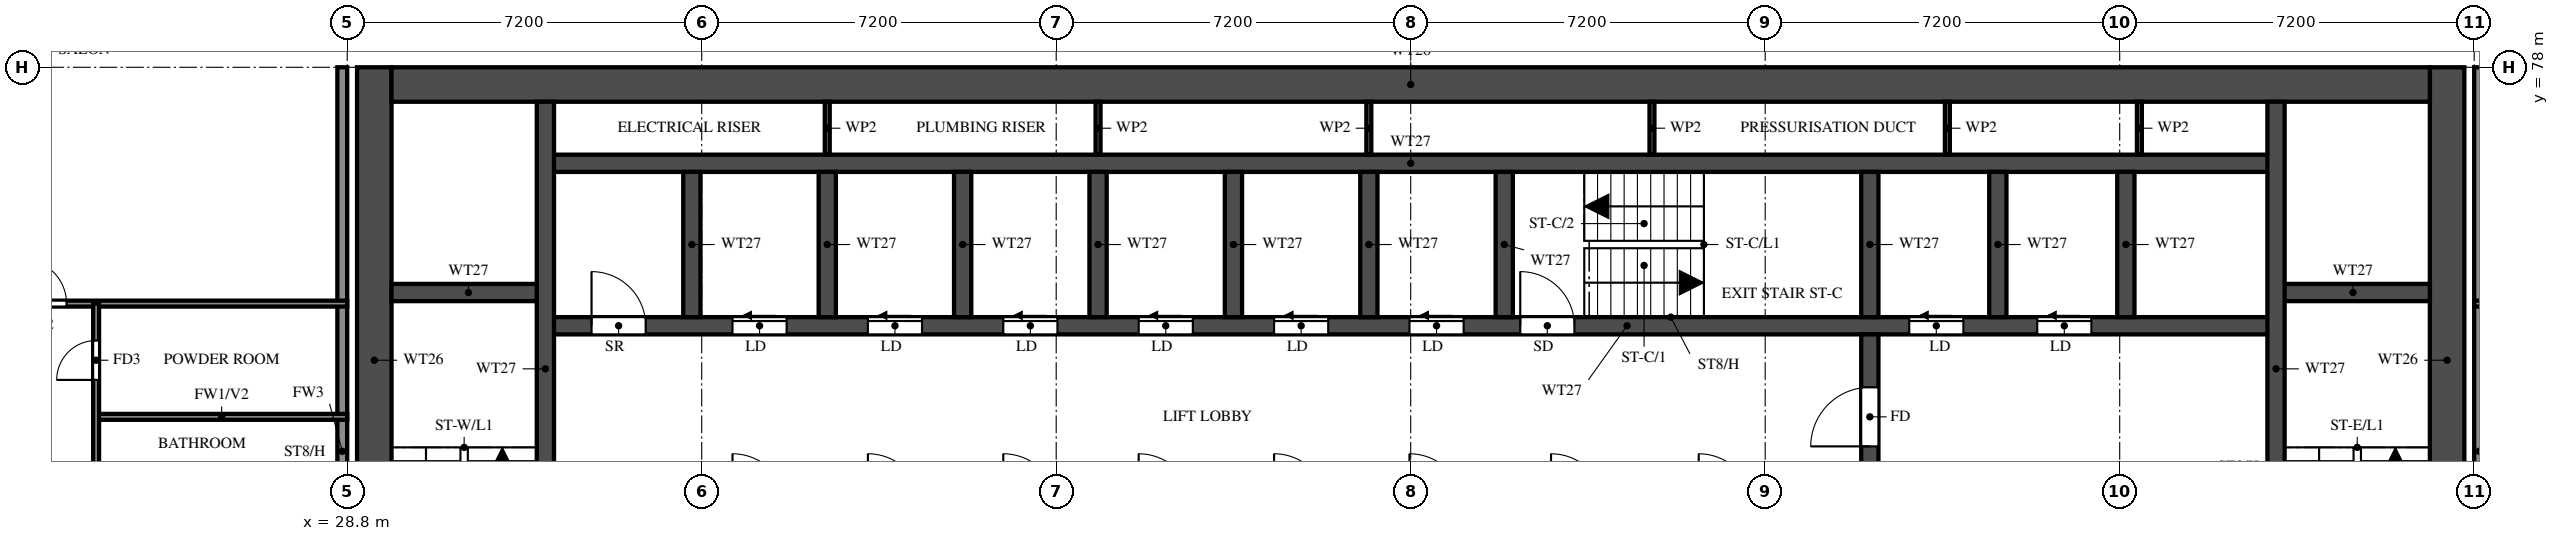
"""IFC4 building model, lengths in metres.
Left out: names, types, materials, properties, quantities, classifications, styles, units other than length and angle.
Written with IfcOpenShell. Run it as: python <this file> out.ifc"""

import sys

from ifc_helpers import new_model, si_unit, direction, frame, frame_2d, origin, place, context, subcontext, project, spatial, rectangle, extrude, element, fill, save


model = new_model("IFC4")
c1 = context("Model", 3, precision=1e-05, world=origin(), true_north=direction((0.0, 1.0)))
c2 = subcontext(c1, "Body", "Model", "MODEL_VIEW")
j1 = project(units=[si_unit("LENGTHUNIT", "METRE"), si_unit("PLANEANGLEUNIT", "RADIAN")], contexts=[c1])
p1 = place(None, origin())
s1 = spatial("IfcSite", under=j1, at=p1, CompositionType="ELEMENT")
p2 = place(p1, origin())
s2 = spatial("IfcBuilding", under=s1, at=p2, CompositionType="ELEMENT")
p3 = place(p2, frame((0.0, 0.0, 181.5)))
s3 = spatial("IfcBuildingStorey", under=s2, at=p3, CompositionType="ELEMENT", Elevation=181.5)
for number, where, z_axis, x_axis in (
    (1, (29.35, 66.1, 0.0), (0.0, 0.0, 1.0), (0.0, 1.0, 0.0)),
    (2, (71.45, 66.1, 0.0), (0.0, 0.0, 1.0), (0.0, 1.0, 0.0)),
):
    element("IfcWall", number, at=place(p3, frame(where, z_axis=z_axis, x_axis=x_axis)), inside=s3, PredefinedType="SHEAR", context=c2, shape_type="SweptSolid", body=[
        extrude(rectangle(XDim=11.9, YDim=0.7, at=frame_2d((5.95, 0.0))), origin(), (0.0, 0.0, 1.0), 3.2),
    ])
p4 = place(p3, frame((29.7, 77.65, 0.0), z_axis=(0.0, 0.0, 1.0), x_axis=(1.0, 0.0, 0.0)))
e3 = element("IfcWall", 3, at=p4, inside=s3, PredefinedType="SHEAR", context=c2, shape_type="SweptSolid", body=[
    extrude(rectangle(XDim=41.4, YDim=0.7, at=frame_2d((20.7, 0.0))), origin(), (0.0, 0.0, 1.0), 3.2),
])
p5 = place(p3, frame((32.825, 72.75, 0.0), z_axis=(0.0, 0.0, 1.0), x_axis=(1.0, 0.0, 0.0)))
e4 = element("IfcWall", 4, at=p5, inside=s3, PredefinedType="SHEAR", context=c2, shape_type="SweptSolid", body=[
    extrude(rectangle(XDim=35.15, YDim=0.35, at=frame_2d((17.575, 0.0))), origin(), (0.0, 0.0, 1.0), 3.2),
])
p6 = place(p5, frame((19.8, 0.0, 0.0)))
e5 = element("IfcOpeningElement", 5, at=p6, cuts=e4, PredefinedType="OPENING", context=c2, shape_type="SweptSolid", body=[
    extrude(rectangle(XDim=1.1, YDim=2.1, at=frame_2d((0.55, 1.05))), frame((0.0, 0.185, 0.0), z_axis=(0.0, -1.0, 0.0), x_axis=(1.0, 0.0, 0.0)), (0.0, 0.0, 1.0), 0.37),
])
p7 = place(p5, frame((27.7, 0.0, 0.0)))
e6 = element("IfcOpeningElement", 6, at=p7, cuts=e4, PredefinedType="OPENING", context=c2, shape_type="SweptSolid", body=[
    extrude(rectangle(XDim=1.1, YDim=2.1, at=frame_2d((0.55, 1.05))), frame((0.0, 0.185, 0.0), z_axis=(0.0, -1.0, 0.0), x_axis=(1.0, 0.0, 0.0)), (0.0, 0.0, 1.0), 0.37),
])
p8 = place(p5, frame((30.3, 0.0, 0.0)))
e7 = element("IfcOpeningElement", 7, at=p8, cuts=e4, PredefinedType="OPENING", context=c2, shape_type="SweptSolid", body=[
    extrude(rectangle(XDim=1.1, YDim=2.1, at=frame_2d((0.55, 1.05))), frame((0.0, 0.185, 0.0), z_axis=(0.0, -1.0, 0.0), x_axis=(1.0, 0.0, 0.0)), (0.0, 0.0, 1.0), 0.37),
])
p9 = place(p5, frame((3.8, 0.0, 0.0)))
e8 = element("IfcOpeningElement", 8, at=p9, cuts=e4, PredefinedType="OPENING", context=c2, shape_type="SweptSolid", body=[
    extrude(rectangle(XDim=1.1, YDim=2.1, at=frame_2d((0.55, 1.05))), frame((0.0, 0.185, 0.0), z_axis=(0.0, -1.0, 0.0), x_axis=(1.0, 0.0, 0.0)), (0.0, 0.0, 1.0), 0.37),
])
p10 = place(p5, frame((6.55, 0.0, 0.0)))
e9 = element("IfcOpeningElement", 9, at=p10, cuts=e4, PredefinedType="OPENING", context=c2, shape_type="SweptSolid", body=[
    extrude(rectangle(XDim=1.1, YDim=2.1, at=frame_2d((0.55, 1.05))), frame((0.0, 0.185, 0.0), z_axis=(0.0, -1.0, 0.0), x_axis=(1.0, 0.0, 0.0)), (0.0, 0.0, 1.0), 0.37),
])
p11 = place(p5, frame((9.3, 0.0, 0.0)))
e10 = element("IfcOpeningElement", 10, at=p11, cuts=e4, PredefinedType="OPENING", context=c2, shape_type="SweptSolid", body=[
    extrude(rectangle(XDim=1.1, YDim=2.1, at=frame_2d((0.55, 1.05))), frame((0.0, 0.185, 0.0), z_axis=(0.0, -1.0, 0.0), x_axis=(1.0, 0.0, 0.0)), (0.0, 0.0, 1.0), 0.37),
])
p12 = place(p5, frame((12.05, 0.0, 0.0)))
e11 = element("IfcOpeningElement", 11, at=p12, cuts=e4, PredefinedType="OPENING", context=c2, shape_type="SweptSolid", body=[
    extrude(rectangle(XDim=1.1, YDim=2.1, at=frame_2d((0.55, 1.05))), frame((0.0, 0.185, 0.0), z_axis=(0.0, -1.0, 0.0), x_axis=(1.0, 0.0, 0.0)), (0.0, 0.0, 1.0), 0.37),
])
p13 = place(p5, frame((14.8, 0.0, 0.0)))
e12 = element("IfcOpeningElement", 12, at=p13, cuts=e4, PredefinedType="OPENING", context=c2, shape_type="SweptSolid", body=[
    extrude(rectangle(XDim=1.1, YDim=2.1, at=frame_2d((0.55, 1.05))), frame((0.0, 0.185, 0.0), z_axis=(0.0, -1.0, 0.0), x_axis=(1.0, 0.0, 0.0)), (0.0, 0.0, 1.0), 0.37),
])
p14 = place(p5, frame((17.55, 0.0, 0.0)))
e13 = element("IfcOpeningElement", 13, at=p14, cuts=e4, PredefinedType="OPENING", context=c2, shape_type="SweptSolid", body=[
    extrude(rectangle(XDim=1.1, YDim=2.1, at=frame_2d((0.55, 1.05))), frame((0.0, 0.185, 0.0), z_axis=(0.0, -1.0, 0.0), x_axis=(1.0, 0.0, 0.0)), (0.0, 0.0, 1.0), 0.37),
])
p15 = place(p5, frame((0.938, 0.0, 0.0)))
e14 = element("IfcOpeningElement", 14, at=p15, cuts=e4, PredefinedType="OPENING", context=c2, shape_type="SweptSolid", body=[
    extrude(rectangle(XDim=1.1, YDim=2.1, at=frame_2d((0.55, 1.05))), frame((0.0, 0.185, 0.0), z_axis=(0.0, -1.0, 0.0), x_axis=(1.0, 0.0, 0.0)), (0.0, 0.0, 1.0), 0.37),
])
p16 = place(p3, frame((32.825, 76.05, 0.0), z_axis=(0.0, 0.0, 1.0), x_axis=(1.0, 0.0, 0.0)))
e15 = element("IfcWall", 15, at=p16, inside=s3, PredefinedType="SHEAR", context=c2, shape_type="SweptSolid", body=[
    extrude(rectangle(XDim=35.15, YDim=0.35, at=frame_2d((17.575, 0.0))), origin(), (0.0, 0.0, 1.0), 3.2),
])
for number, where, z_axis, x_axis in (
    (16, (29.7, 73.425, 0.0), (0.0, 0.0, 1.0), (1.0, 0.0, 0.0)),
    (17, (67.975, 73.425, 0.0), (0.0, 0.0, 1.0), (1.0, 0.0, 0.0)),
):
    element("IfcWall", number, at=place(p3, frame(where, z_axis=z_axis, x_axis=x_axis)), inside=s3, PredefinedType="SHEAR", context=c2, shape_type="SweptSolid", body=[
        extrude(rectangle(XDim=3.125, YDim=0.35, at=frame_2d((1.562, 0.0))), origin(), (0.0, 0.0, 1.0), 3.2),
    ])
p17 = place(p3, frame((32.825, 66.45, 0.0), z_axis=(0.0, 0.0, 1.0), x_axis=(0.0, 1.0, 0.0)))
e18 = element("IfcWall", 18, at=p17, inside=s3, PredefinedType="SHEAR", context=c2, shape_type="SweptSolid", body=[
    extrude(rectangle(XDim=10.85, YDim=0.35, at=frame_2d((5.425, 0.0))), origin(), (0.0, 0.0, 1.0), 3.2),
])
p18 = place(p3, frame((67.975, 66.45, 0.0), z_axis=(0.0, 0.0, 1.0), x_axis=(0.0, 1.0, 0.0)))
e19 = element("IfcWall", 19, at=p18, inside=s3, PredefinedType="SHEAR", context=c2, shape_type="SweptSolid", body=[
    extrude(rectangle(XDim=10.85, YDim=0.35, at=frame_2d((5.425, 0.0))), origin(), (0.0, 0.0, 1.0), 3.2),
])
p19 = place(p18, frame((0.15, 0.0, 0.0)))
e20 = element("IfcOpeningElement", 20, at=p19, cuts=e19, PredefinedType="OPENING", context=c2, shape_type="SweptSolid", body=[
    extrude(rectangle(XDim=1.1, YDim=2.1, at=frame_2d((0.55, 1.05))), frame((0.0, 0.185, 0.0), z_axis=(0.0, -1.0, 0.0), x_axis=(1.0, 0.0, 0.0)), (0.0, 0.0, 1.0), 0.37),
])
p20 = place(p3, frame((59.725, 66.45, 0.0), z_axis=(0.0, 0.0, 1.0), x_axis=(0.0, 1.0, 0.0)))
e21 = element("IfcWall", 21, at=p20, inside=s3, PredefinedType="SHEAR", context=c2, shape_type="SweptSolid", body=[
    extrude(rectangle(XDim=6.125, YDim=0.35, at=frame_2d((3.062, 0.0))), origin(), (0.0, 0.0, 1.0), 3.2),
])
p21 = place(p20, frame((3.85, 0.0, 0.0)))
e22 = element("IfcOpeningElement", 22, at=p21, cuts=e21, PredefinedType="OPENING", context=c2, shape_type="SweptSolid", body=[
    extrude(rectangle(XDim=1.2, YDim=2.1, at=frame_2d((0.6, 1.05))), frame((0.0, 0.185, 0.0), z_axis=(0.0, -1.0, 0.0), x_axis=(1.0, 0.0, 0.0)), (0.0, 0.0, 1.0), 0.37),
])
for number, where, z_axis, x_axis in (
    (23, (59.725, 72.925, 0.0), (0.0, 0.0, 1.0), (0.0, 1.0, 0.0)),
    (24, (35.8, 72.925, 0.0), (0.0, 0.0, 1.0), (0.0, 1.0, 0.0)),
    (25, (38.55, 72.925, 0.0), (0.0, 0.0, 1.0), (0.0, 1.0, 0.0)),
    (26, (41.3, 72.925, 0.0), (0.0, 0.0, 1.0), (0.0, 1.0, 0.0)),
    (27, (44.05, 72.925, 0.0), (0.0, 0.0, 1.0), (0.0, 1.0, 0.0)),
    (28, (46.8, 72.925, 0.0), (0.0, 0.0, 1.0), (0.0, 1.0, 0.0)),
    (29, (49.55, 72.925, 0.0), (0.0, 0.0, 1.0), (0.0, 1.0, 0.0)),
    (30, (52.3, 72.925, 0.0), (0.0, 0.0, 1.0), (0.0, 1.0, 0.0)),
    (31, (62.325, 72.925, 0.0), (0.0, 0.0, 1.0), (0.0, 1.0, 0.0)),
    (32, (64.925, 72.925, 0.0), (0.0, 0.0, 1.0), (0.0, 1.0, 0.0)),
):
    element("IfcWall", number, at=place(p3, frame(where, z_axis=z_axis, x_axis=x_axis)), inside=s3, PredefinedType="SHEAR", context=c2, shape_type="SweptSolid", body=[
        extrude(rectangle(XDim=2.95, YDim=0.35, at=frame_2d((1.475, 0.0))), origin(), (0.0, 0.0, 1.0), 3.2),
    ])
for number, where, z_axis, x_axis in (
    (33, (38.55, 76.225, 0.0), (0.0, 0.0, 1.0), (0.0, 1.0, 0.0)),
    (34, (44.05, 76.225, 0.0), (0.0, 0.0, 1.0), (0.0, 1.0, 0.0)),
    (35, (49.55, 76.225, 0.0), (0.0, 0.0, 1.0), (0.0, 1.0, 0.0)),
    (36, (55.3, 76.225, 0.0), (0.0, 0.0, 1.0), (0.0, 1.0, 0.0)),
    (37, (61.3, 76.225, 0.0), (0.0, 0.0, 1.0), (0.0, 1.0, 0.0)),
    (38, (65.2, 76.225, 0.0), (0.0, 0.0, 1.0), (0.0, 1.0, 0.0)),
):
    element("IfcWall", number, at=place(p3, frame(where, z_axis=z_axis, x_axis=x_axis)), inside=s3, PredefinedType="PARTITIONING", context=c2, shape_type="SweptSolid", body=[
        extrude(rectangle(XDim=1.075, YDim=0.1, at=frame_2d((0.538, 0.0))), origin(), (0.0, 0.0, 1.0), 3.2),
    ])
for number, where, z_axis, x_axis in (
    (39, (28.7, 62.4, 0.0), (0.0, 0.0, 1.0), (0.0, 1.0, 0.0)),
    (40, (72.1, 62.4, 0.0), (0.0, 0.0, 1.0), (0.0, 1.0, 0.0)),
):
    element("IfcWall", number, at=place(p3, frame(where, z_axis=z_axis, x_axis=x_axis)), inside=s3, PredefinedType="SOLIDWALL", context=c2, shape_type="SweptSolid", body=[
        extrude(rectangle(XDim=15.6, YDim=0.2, at=frame_2d((7.8, 0.0))), origin(), (0.0, 0.0, 1.0), 3.2),
    ])
p22 = place(p3, frame((23.7, 70.9, 0.0), z_axis=(0.0, 0.0, 1.0), x_axis=(1.0, 0.0, 0.0)))
e41 = element("IfcWall", 41, at=p22, inside=s3, PredefinedType="PARTITIONING", context=c2, shape_type="SweptSolid", body=[
    extrude(rectangle(XDim=5.1, YDim=0.12, at=frame_2d((2.55, 0.0))), origin(), (0.0, 0.0, 1.0), 3.2),
])
p23 = place(p3, frame((14.525, 73.2, 0.0), z_axis=(0.0, 0.0, 1.0), x_axis=(1.0, 0.0, 0.0)))
e42 = element("IfcWall", 42, at=p23, inside=s3, PredefinedType="PARTITIONING", context=c2, shape_type="SweptSolid", body=[
    extrude(rectangle(XDim=14.275, YDim=0.12, at=frame_2d((7.138, 0.0))), origin(), (0.0, 0.0, 1.0), 2.3),
])
p24 = place(p23, frame((7.675, 0.0, 0.0)))
e43 = element("IfcOpeningElement", 43, at=p24, cuts=e42, PredefinedType="OPENING", context=c2, shape_type="SweptSolid", body=[
    extrude(rectangle(XDim=0.9, YDim=2.1, at=frame_2d((0.45, 1.05))), frame((0.0, 0.07, 0.0), z_axis=(0.0, -1.0, 0.0), x_axis=(1.0, 0.0, 0.0)), (0.0, 0.0, 1.0), 0.14),
])
p25 = place(p3, frame((72.0, 73.2, 0.0), z_axis=(0.0, 0.0, 1.0), x_axis=(1.0, 0.0, 0.0)))
e44 = element("IfcWall", 44, at=p25, inside=s3, PredefinedType="PARTITIONING", context=c2, shape_type="SweptSolid", body=[
    extrude(rectangle(XDim=14.275, YDim=0.12, at=frame_2d((7.137, 0.0))), origin(), (0.0, 0.0, 1.0), 2.3),
])
p26 = place(p25, frame((5.7, 0.0, 0.0)))
e45 = element("IfcOpeningElement", 45, at=p26, cuts=e44, PredefinedType="OPENING", context=c2, shape_type="SweptSolid", body=[
    extrude(rectangle(XDim=0.9, YDim=2.1, at=frame_2d((0.45, 1.05))), frame((0.0, 0.07, 0.0), z_axis=(0.0, -1.0, 0.0), x_axis=(1.0, 0.0, 0.0)), (0.0, 0.0, 1.0), 0.14),
])
p27 = place(p3, frame((23.7, 61.2, 0.0), z_axis=(0.0, 0.0, 1.0), x_axis=(0.0, 1.0, 0.0)))
e46 = element("IfcWall", 46, at=p27, inside=s3, PredefinedType="PARTITIONING", context=c2, shape_type="SweptSolid", body=[
    extrude(rectangle(XDim=12.0, YDim=0.12, at=frame_2d((6.0, 0.0))), origin(), (0.0, 0.0, 1.0), 3.2),
])
p28 = place(p27, frame((4.2, 0.0, 0.0)))
e47 = element("IfcOpeningElement", 47, at=p28, cuts=e46, PredefinedType="OPENING", context=c2, shape_type="SweptSolid", body=[
    extrude(rectangle(XDim=0.9, YDim=2.1, at=frame_2d((0.45, 1.05))), frame((0.0, 0.07, 0.0), z_axis=(0.0, -1.0, 0.0), x_axis=(1.0, 0.0, 0.0)), (0.0, 0.0, 1.0), 0.14),
])
p29 = place(p27, frame((7.975, 0.0, 0.0)))
e48 = element("IfcOpeningElement", 48, at=p29, cuts=e46, PredefinedType="OPENING", context=c2, shape_type="SweptSolid", body=[
    extrude(rectangle(XDim=0.8, YDim=2.1, at=frame_2d((0.4, 1.05))), frame((0.0, 0.07, 0.0), z_axis=(0.0, -1.0, 0.0), x_axis=(1.0, 0.0, 0.0)), (0.0, 0.0, 1.0), 0.14),
])
p30 = place(p27, frame((10.45, 0.0, 0.0)))
e49 = element("IfcOpeningElement", 49, at=p30, cuts=e46, PredefinedType="OPENING", context=c2, shape_type="SweptSolid", body=[
    extrude(rectangle(XDim=0.8, YDim=2.1, at=frame_2d((0.4, 1.05))), frame((0.0, 0.07, 0.0), z_axis=(0.0, -1.0, 0.0), x_axis=(1.0, 0.0, 0.0)), (0.0, 0.0, 1.0), 0.14),
])
p31 = place(p6, origin())
e50 = element("IfcDoor", 50, at=p31, inside=s3, OperationType="SINGLE_SWING_LEFT", PredefinedType="DOOR", context=c2, shape_type="SweptSolid", body=[
    extrude(rectangle(XDim=1.1, YDim=2.1, at=frame_2d((0.55, 1.05))), frame((0.0, 0.025, 0.0), z_axis=(0.0, -1.0, 0.0), x_axis=(1.0, 0.0, 0.0)), (0.0, 0.0, 1.0), 0.05),
])
fill(e5, e50)
p32 = place(p21, origin())
e51 = element("IfcDoor", 51, at=p32, inside=s3, OperationType="SINGLE_SWING_LEFT", PredefinedType="DOOR", context=c2, shape_type="SweptSolid", body=[
    extrude(rectangle(XDim=1.2, YDim=2.1, at=frame_2d((0.6, 1.05))), frame((0.0, 0.025, 0.0), z_axis=(0.0, -1.0, 0.0), x_axis=(1.0, 0.0, 0.0)), (0.0, 0.0, 1.0), 0.05),
])
fill(e22, e51)
p33 = place(p7, origin())
e52 = element("IfcDoor", 52, at=p33, inside=s3, OperationType="SLIDING_TO_LEFT", PredefinedType="DOOR", context=c2, shape_type="SweptSolid", body=[
    extrude(rectangle(XDim=1.1, YDim=2.1, at=frame_2d((0.55, 1.05))), frame((0.0, 0.025, 0.0), z_axis=(0.0, -1.0, 0.0), x_axis=(1.0, 0.0, 0.0)), (0.0, 0.0, 1.0), 0.05),
])
fill(e6, e52)
p34 = place(p8, origin())
e53 = element("IfcDoor", 53, at=p34, inside=s3, OperationType="SLIDING_TO_LEFT", PredefinedType="DOOR", context=c2, shape_type="SweptSolid", body=[
    extrude(rectangle(XDim=1.1, YDim=2.1, at=frame_2d((0.55, 1.05))), frame((0.0, 0.025, 0.0), z_axis=(0.0, -1.0, 0.0), x_axis=(1.0, 0.0, 0.0)), (0.0, 0.0, 1.0), 0.05),
])
fill(e7, e53)
p35 = place(p9, origin())
e54 = element("IfcDoor", 54, at=p35, inside=s3, OperationType="SLIDING_TO_LEFT", PredefinedType="DOOR", context=c2, shape_type="SweptSolid", body=[
    extrude(rectangle(XDim=1.1, YDim=2.1, at=frame_2d((0.55, 1.05))), frame((0.0, 0.025, 0.0), z_axis=(0.0, -1.0, 0.0), x_axis=(1.0, 0.0, 0.0)), (0.0, 0.0, 1.0), 0.05),
])
fill(e8, e54)
p36 = place(p10, origin())
e55 = element("IfcDoor", 55, at=p36, inside=s3, OperationType="SLIDING_TO_LEFT", PredefinedType="DOOR", context=c2, shape_type="SweptSolid", body=[
    extrude(rectangle(XDim=1.1, YDim=2.1, at=frame_2d((0.55, 1.05))), frame((0.0, 0.025, 0.0), z_axis=(0.0, -1.0, 0.0), x_axis=(1.0, 0.0, 0.0)), (0.0, 0.0, 1.0), 0.05),
])
fill(e9, e55)
p37 = place(p11, origin())
e56 = element("IfcDoor", 56, at=p37, inside=s3, OperationType="SLIDING_TO_LEFT", PredefinedType="DOOR", context=c2, shape_type="SweptSolid", body=[
    extrude(rectangle(XDim=1.1, YDim=2.1, at=frame_2d((0.55, 1.05))), frame((0.0, 0.025, 0.0), z_axis=(0.0, -1.0, 0.0), x_axis=(1.0, 0.0, 0.0)), (0.0, 0.0, 1.0), 0.05),
])
fill(e10, e56)
p38 = place(p12, origin())
e57 = element("IfcDoor", 57, at=p38, inside=s3, OperationType="SLIDING_TO_LEFT", PredefinedType="DOOR", context=c2, shape_type="SweptSolid", body=[
    extrude(rectangle(XDim=1.1, YDim=2.1, at=frame_2d((0.55, 1.05))), frame((0.0, 0.025, 0.0), z_axis=(0.0, -1.0, 0.0), x_axis=(1.0, 0.0, 0.0)), (0.0, 0.0, 1.0), 0.05),
])
fill(e11, e57)
p39 = place(p13, origin())
e58 = element("IfcDoor", 58, at=p39, inside=s3, OperationType="SLIDING_TO_LEFT", PredefinedType="DOOR", context=c2, shape_type="SweptSolid", body=[
    extrude(rectangle(XDim=1.1, YDim=2.1, at=frame_2d((0.55, 1.05))), frame((0.0, 0.025, 0.0), z_axis=(0.0, -1.0, 0.0), x_axis=(1.0, 0.0, 0.0)), (0.0, 0.0, 1.0), 0.05),
])
fill(e12, e58)
p40 = place(p14, origin())
e59 = element("IfcDoor", 59, at=p40, inside=s3, OperationType="SLIDING_TO_LEFT", PredefinedType="DOOR", context=c2, shape_type="SweptSolid", body=[
    extrude(rectangle(XDim=1.1, YDim=2.1, at=frame_2d((0.55, 1.05))), frame((0.0, 0.025, 0.0), z_axis=(0.0, -1.0, 0.0), x_axis=(1.0, 0.0, 0.0)), (0.0, 0.0, 1.0), 0.05),
])
fill(e13, e59)
p41 = place(p15, origin())
e60 = element("IfcDoor", 60, at=p41, inside=s3, OperationType="SINGLE_SWING_LEFT", PredefinedType="DOOR", context=c2, shape_type="SweptSolid", body=[
    extrude(rectangle(XDim=1.1, YDim=2.1, at=frame_2d((0.55, 1.05))), frame((0.0, 0.025, 0.0), z_axis=(0.0, -1.0, 0.0), x_axis=(1.0, 0.0, 0.0)), (0.0, 0.0, 1.0), 0.05),
])
fill(e14, e60)
p42 = place(p24, origin())
e61 = element("IfcDoor", 61, at=p42, inside=s3, OperationType="SINGLE_SWING_RIGHT", PredefinedType="DOOR", context=c2, shape_type="SweptSolid", body=[
    extrude(rectangle(XDim=0.9, YDim=2.1, at=frame_2d((0.45, 1.05))), frame((0.0, 0.025, 0.0), z_axis=(0.0, -1.0, 0.0), x_axis=(1.0, 0.0, 0.0)), (0.0, 0.0, 1.0), 0.05),
])
fill(e43, e61)
p43 = place(p30, origin())
e62 = element("IfcDoor", 62, at=p43, inside=s3, OperationType="SINGLE_SWING_LEFT", PredefinedType="DOOR", context=c2, shape_type="SweptSolid", body=[
    extrude(rectangle(XDim=0.8, YDim=2.1, at=frame_2d((0.4, 1.05))), frame((0.0, 0.025, 0.0), z_axis=(0.0, -1.0, 0.0), x_axis=(1.0, 0.0, 0.0)), (0.0, 0.0, 1.0), 0.05),
])
fill(e49, e62)
save(model, sys.argv[1])
